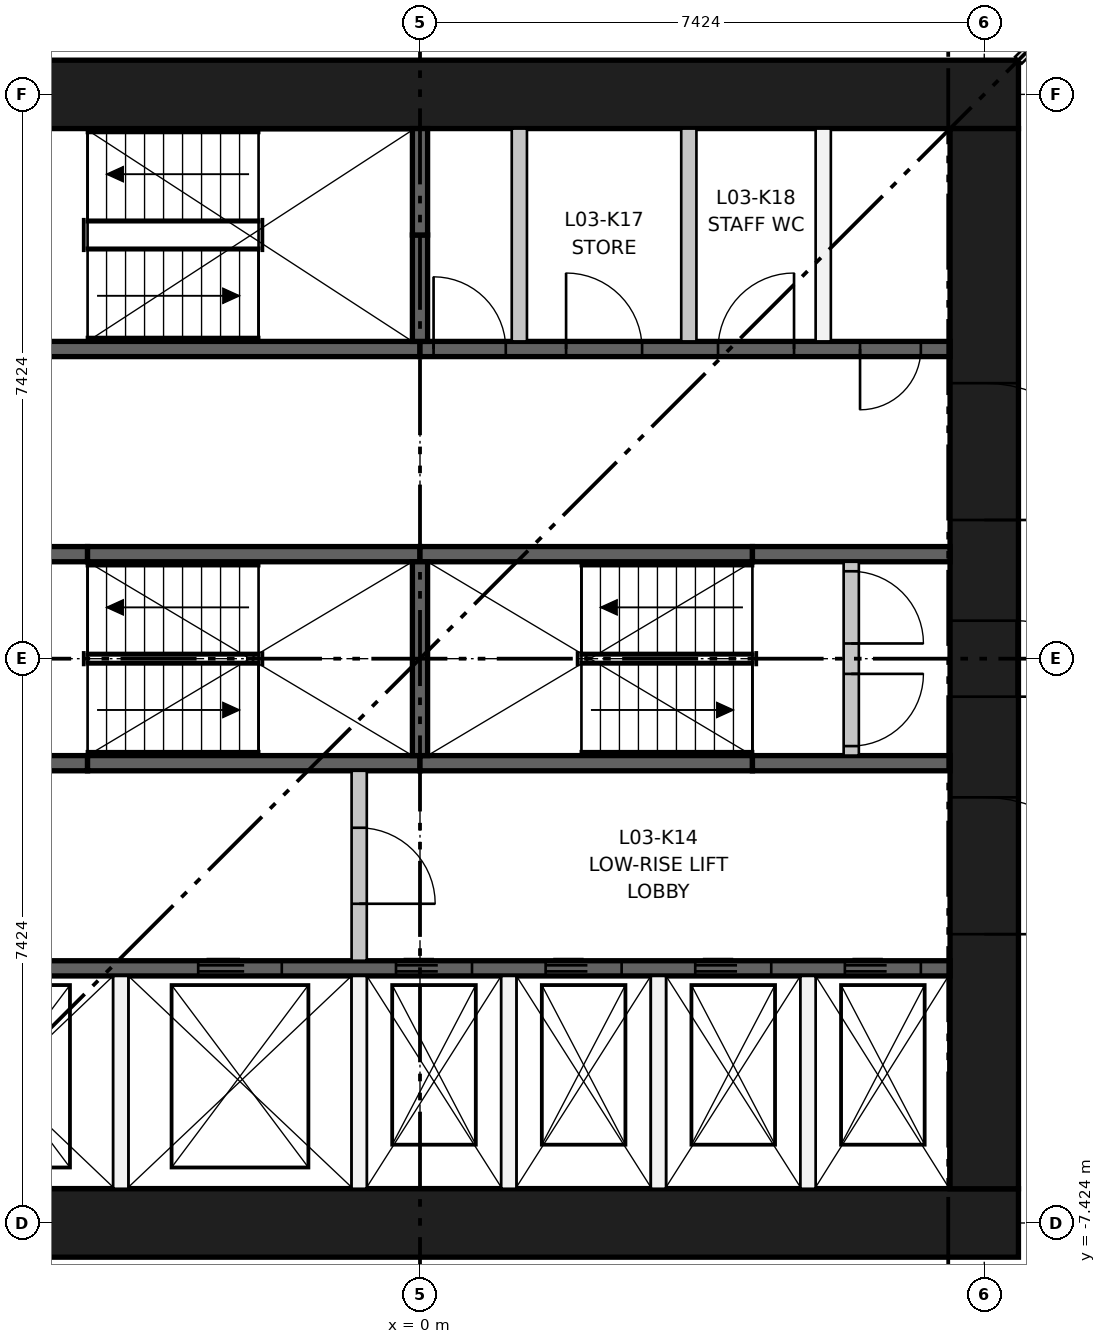
"""IFC4 building model, lengths in metres.
Left out: names, types, materials, properties, quantities, classifications, styles, units other than length and angle.
Written with IfcOpenShell. Run it as: python <this file> out.ifc"""

import sys

from ifc_helpers import new_model, si_unit, direction, frame, frame_2d, origin, place, context, subcontext, project, spatial, rectangle, extrude, element, fill, save


model = new_model("IFC4")
c1 = context("Model", 3, precision=1e-05, world=origin(), true_north=direction((0.0, 1.0)))
c2 = subcontext(c1, "Body", "Model", "MODEL_VIEW")
j1 = project(units=[si_unit("LENGTHUNIT", "METRE"), si_unit("PLANEANGLEUNIT", "RADIAN")], contexts=[c1])
p1 = place(None, origin())
s1 = spatial("IfcSite", under=j1, at=p1, CompositionType="ELEMENT")
p2 = place(p1, origin())
s2 = spatial("IfcBuilding", under=s1, at=p2, CompositionType="ELEMENT")
p3 = place(p2, frame((0.0, 0.0, 14.4)))
s3 = spatial("IfcBuildingStorey", under=s2, at=p3, CompositionType="ELEMENT", Elevation=14.4)
for number, where, z_axis, x_axis in (
    (1, (-7.874, -7.424, 0.0), (0.0, 0.0, 1.0), (1.0, 0.0, 0.0)),
    (2, (-7.874, 7.424, 0.0), (0.0, 0.0, 1.0), (1.0, 0.0, 0.0)),
):
    element("IfcWall", number, at=place(p3, frame(where, z_axis=z_axis, x_axis=x_axis)), inside=s3, PredefinedType="SHEAR", context=c2, shape_type="SweptSolid", body=[
        extrude(rectangle(XDim=15.748, YDim=0.9, at=frame_2d((7.874, 0.0))), origin(), (0.0, 0.0, 1.0), 4.1),
    ])
p4 = place(p3, frame((7.424, -6.974, 0.0), z_axis=(0.0, 0.0, 1.0), x_axis=(0.0, 1.0, 0.0)))
e3 = element("IfcWall", 3, at=p4, inside=s3, PredefinedType="SHEAR", context=c2, shape_type="SweptSolid", body=[
    extrude(rectangle(XDim=13.948, YDim=0.9, at=frame_2d((6.974, 0.0))), origin(), (0.0, 0.0, 1.0), 4.1),
])
p5 = place(p4, frame((6.474, 0.0, 0.0)))
e4 = element("IfcOpeningElement", 4, at=p5, cuts=e3, PredefinedType="OPENING", context=c2, shape_type="SweptSolid", body=[
    extrude(rectangle(XDim=1.0, YDim=2.1, at=frame_2d((0.5, 1.05))), frame((0.0, 0.46, 0.0), z_axis=(0.0, -1.0, 0.0), x_axis=(1.0, 0.0, 0.0)), (0.0, 0.0, 1.0), 0.92),
])
p6 = place(p4, frame((3.35, 0.0, 0.0)))
e5 = element("IfcOpeningElement", 5, at=p6, cuts=e3, PredefinedType="OPENING", context=c2, shape_type="SweptSolid", body=[
    extrude(rectangle(XDim=1.8, YDim=2.1, at=frame_2d((0.9, 1.05))), frame((0.0, 0.46, 0.0), z_axis=(0.0, -1.0, 0.0), x_axis=(1.0, 0.0, 0.0)), (0.0, 0.0, 1.0), 0.92),
])
p7 = place(p4, frame((8.799, 0.0, 0.0)))
e6 = element("IfcOpeningElement", 6, at=p7, cuts=e3, PredefinedType="OPENING", context=c2, shape_type="SweptSolid", body=[
    extrude(rectangle(XDim=1.8, YDim=2.1, at=frame_2d((0.9, 1.05))), frame((0.0, 0.46, 0.0), z_axis=(0.0, -1.0, 0.0), x_axis=(1.0, 0.0, 0.0)), (0.0, 0.0, 1.0), 0.92),
])
p8 = place(p3, frame((-6.974, -4.074, 0.0), z_axis=(0.0, 0.0, 1.0), x_axis=(1.0, 0.0, 0.0)))
e7 = element("IfcWall", 7, at=p8, inside=s3, PredefinedType="SHEAR", context=c2, shape_type="SweptSolid", body=[
    extrude(rectangle(XDim=13.948, YDim=0.2, at=frame_2d((6.974, 0.0))), origin(), (0.0, 0.0, 1.0), 3.7),
])
p9 = place(p8, frame((0.918, 0.0, 0.0)))
e8 = element("IfcOpeningElement", 8, at=p9, cuts=e7, PredefinedType="OPENING", context=c2, shape_type="SweptSolid", body=[
    extrude(rectangle(XDim=1.1, YDim=2.1, at=frame_2d((0.55, 1.05))), frame((0.0, 0.11, 0.0), z_axis=(0.0, -1.0, 0.0), x_axis=(1.0, 0.0, 0.0)), (0.0, 0.0, 1.0), 0.22),
])
p10 = place(p8, frame((4.055, 0.0, 0.0)))
e9 = element("IfcOpeningElement", 9, at=p10, cuts=e7, PredefinedType="OPENING", context=c2, shape_type="SweptSolid", body=[
    extrude(rectangle(XDim=1.1, YDim=2.1, at=frame_2d((0.55, 1.05))), frame((0.0, 0.11, 0.0), z_axis=(0.0, -1.0, 0.0), x_axis=(1.0, 0.0, 0.0)), (0.0, 0.0, 1.0), 0.22),
])
p11 = place(p8, frame((6.658, 0.0, 0.0)))
e10 = element("IfcOpeningElement", 10, at=p11, cuts=e7, PredefinedType="OPENING", context=c2, shape_type="SweptSolid", body=[
    extrude(rectangle(XDim=1.0, YDim=2.1, at=frame_2d((0.5, 1.05))), frame((0.0, 0.11, 0.0), z_axis=(0.0, -1.0, 0.0), x_axis=(1.0, 0.0, 0.0)), (0.0, 0.0, 1.0), 0.22),
])
p12 = place(p8, frame((8.627, 0.0, 0.0)))
e11 = element("IfcOpeningElement", 11, at=p12, cuts=e7, PredefinedType="OPENING", context=c2, shape_type="SweptSolid", body=[
    extrude(rectangle(XDim=1.0, YDim=2.1, at=frame_2d((0.5, 1.05))), frame((0.0, 0.11, 0.0), z_axis=(0.0, -1.0, 0.0), x_axis=(1.0, 0.0, 0.0)), (0.0, 0.0, 1.0), 0.22),
])
p13 = place(p8, frame((10.595, 0.0, 0.0)))
e12 = element("IfcOpeningElement", 12, at=p13, cuts=e7, PredefinedType="OPENING", context=c2, shape_type="SweptSolid", body=[
    extrude(rectangle(XDim=1.0, YDim=2.1, at=frame_2d((0.5, 1.05))), frame((0.0, 0.11, 0.0), z_axis=(0.0, -1.0, 0.0), x_axis=(1.0, 0.0, 0.0)), (0.0, 0.0, 1.0), 0.22),
])
p14 = place(p8, frame((12.564, 0.0, 0.0)))
e13 = element("IfcOpeningElement", 13, at=p14, cuts=e7, PredefinedType="OPENING", context=c2, shape_type="SweptSolid", body=[
    extrude(rectangle(XDim=1.0, YDim=2.1, at=frame_2d((0.5, 1.05))), frame((0.0, 0.11, 0.0), z_axis=(0.0, -1.0, 0.0), x_axis=(1.0, 0.0, 0.0)), (0.0, 0.0, 1.0), 0.22),
])
p15 = place(p3, frame((-6.974, 4.074, 0.0), z_axis=(0.0, 0.0, 1.0), x_axis=(1.0, 0.0, 0.0)))
e14 = element("IfcWall", 14, at=p15, inside=s3, PredefinedType="SHEAR", context=c2, shape_type="SweptSolid", body=[
    extrude(rectangle(XDim=6.974, YDim=0.2, at=frame_2d((3.487, 0.0))), origin(), (0.0, 0.0, 1.0), 3.7),
])
p16 = place(p3, frame((0.0, 4.074, 0.0), z_axis=(0.0, 0.0, 1.0), x_axis=(1.0, 0.0, 0.0)))
e15 = element("IfcWall", 15, at=p16, inside=s3, PredefinedType="SHEAR", context=c2, shape_type="SweptSolid", body=[
    extrude(rectangle(XDim=6.974, YDim=0.2, at=frame_2d((3.487, 0.0))), origin(), (0.0, 0.0, 1.0), 3.7),
])
p17 = place(p16, frame((0.179, 0.0, 0.0)))
e16 = element("IfcOpeningElement", 16, at=p17, cuts=e15, PredefinedType="OPENING", context=c2, shape_type="SweptSolid", body=[
    extrude(rectangle(XDim=0.95, YDim=2.1, at=frame_2d((0.475, 1.05))), frame((0.0, 0.11, 0.0), z_axis=(0.0, -1.0, 0.0), x_axis=(1.0, 0.0, 0.0)), (0.0, 0.0, 1.0), 0.22),
])
p18 = place(p16, frame((1.922, 0.0, 0.0)))
e17 = element("IfcOpeningElement", 17, at=p18, cuts=e15, PredefinedType="OPENING", context=c2, shape_type="SweptSolid", body=[
    extrude(rectangle(XDim=1.0, YDim=2.1, at=frame_2d((0.5, 1.05))), frame((0.0, 0.11, 0.0), z_axis=(0.0, -1.0, 0.0), x_axis=(1.0, 0.0, 0.0)), (0.0, 0.0, 1.0), 0.22),
])
p19 = place(p16, frame((3.921, 0.0, 0.0)))
e18 = element("IfcOpeningElement", 18, at=p19, cuts=e15, PredefinedType="OPENING", context=c2, shape_type="SweptSolid", body=[
    extrude(rectangle(XDim=1.0, YDim=2.1, at=frame_2d((0.5, 1.05))), frame((0.0, 0.11, 0.0), z_axis=(0.0, -1.0, 0.0), x_axis=(1.0, 0.0, 0.0)), (0.0, 0.0, 1.0), 0.22),
])
p20 = place(p16, frame((5.79, 0.0, 0.0)))
e19 = element("IfcOpeningElement", 19, at=p20, cuts=e15, PredefinedType="OPENING", context=c2, shape_type="SweptSolid", body=[
    extrude(rectangle(XDim=0.8, YDim=2.1, at=frame_2d((0.4, 1.05))), frame((0.0, 0.11, 0.0), z_axis=(0.0, -1.0, 0.0), x_axis=(1.0, 0.0, 0.0)), (0.0, 0.0, 1.0), 0.22),
])
p21 = place(p3, frame((-6.974, -1.375, 0.0), z_axis=(0.0, 0.0, 1.0), x_axis=(1.0, 0.0, 0.0)))
e20 = element("IfcWall", 20, at=p21, inside=s3, PredefinedType="SHEAR", context=c2, shape_type="SweptSolid", body=[
    extrude(rectangle(XDim=2.6, YDim=0.2, at=frame_2d((1.3, 0.0))), origin(), (0.0, 0.0, 1.0), 3.7),
])
for number, where, z_axis, x_axis in (
    (21, (-4.374, -1.375, 0.0), (0.0, 0.0, 1.0), (1.0, 0.0, 0.0)),
    (22, (0.0, -1.375, 0.0), (0.0, 0.0, 1.0), (1.0, 0.0, 0.0)),
):
    element("IfcWall", number, at=place(p3, frame(where, z_axis=z_axis, x_axis=x_axis)), inside=s3, PredefinedType="SHEAR", context=c2, shape_type="SweptSolid", body=[
        extrude(rectangle(XDim=4.374, YDim=0.2, at=frame_2d((2.187, 0.0))), origin(), (0.0, 0.0, 1.0), 3.7),
    ])
for number, where, z_axis, x_axis in (
    (23, (4.374, -1.375, 0.0), (0.0, 0.0, 1.0), (1.0, 0.0, 0.0)),
    (24, (-6.974, 1.375, 0.0), (0.0, 0.0, 1.0), (1.0, 0.0, 0.0)),
):
    element("IfcWall", number, at=place(p3, frame(where, z_axis=z_axis, x_axis=x_axis)), inside=s3, PredefinedType="SHEAR", context=c2, shape_type="SweptSolid", body=[
        extrude(rectangle(XDim=2.6, YDim=0.2, at=frame_2d((1.3, 0.0))), origin(), (0.0, 0.0, 1.0), 3.7),
    ])
for number, where, z_axis, x_axis in (
    (25, (-4.374, 1.375, 0.0), (0.0, 0.0, 1.0), (1.0, 0.0, 0.0)),
    (26, (0.0, 1.375, 0.0), (0.0, 0.0, 1.0), (1.0, 0.0, 0.0)),
):
    element("IfcWall", number, at=place(p3, frame(where, z_axis=z_axis, x_axis=x_axis)), inside=s3, PredefinedType="SHEAR", context=c2, shape_type="SweptSolid", body=[
        extrude(rectangle(XDim=4.374, YDim=0.2, at=frame_2d((2.187, 0.0))), origin(), (0.0, 0.0, 1.0), 3.7),
    ])
p22 = place(p3, frame((4.374, 1.375, 0.0), z_axis=(0.0, 0.0, 1.0), x_axis=(1.0, 0.0, 0.0)))
e27 = element("IfcWall", 27, at=p22, inside=s3, PredefinedType="SHEAR", context=c2, shape_type="SweptSolid", body=[
    extrude(rectangle(XDim=2.6, YDim=0.2, at=frame_2d((1.3, 0.0))), origin(), (0.0, 0.0, 1.0), 3.7),
])
p23 = place(p3, frame((0.0, -1.275, 0.0), z_axis=(0.0, 0.0, 1.0), x_axis=(0.0, 1.0, 0.0)))
e28 = element("IfcWall", 28, at=p23, inside=s3, PredefinedType="SHEAR", context=c2, shape_type="SweptSolid", body=[
    extrude(rectangle(XDim=2.55, YDim=0.2, at=frame_2d((1.275, 0.0))), origin(), (0.0, 0.0, 1.0), 3.7),
])
for number, where, z_axis, x_axis in (
    (29, (-3.937, -6.974, 0.0), (0.0, 0.0, 1.0), (0.0, 1.0, 0.0)),
    (30, (-0.8, -6.974, 0.0), (0.0, 0.0, 1.0), (0.0, 1.0, 0.0)),
):
    element("IfcWall", number, at=place(p3, frame(where, z_axis=z_axis, x_axis=x_axis)), inside=s3, PredefinedType="PARTITIONING", context=c2, shape_type="SweptSolid", body=[
        extrude(rectangle(XDim=2.8, YDim=0.2, at=frame_2d((1.4, 0.0))), origin(), (0.0, 0.0, 1.0), 3.7),
    ])
p24 = place(p3, frame((-0.8, -3.974, 0.0), z_axis=(0.0, 0.0, 1.0), x_axis=(0.0, 1.0, 0.0)))
e31 = element("IfcWall", 31, at=p24, inside=s3, PredefinedType="PARTITIONING", context=c2, shape_type="SweptSolid", body=[
    extrude(rectangle(XDim=2.499, YDim=0.2, at=frame_2d((1.25, 0.0))), origin(), (0.0, 0.0, 1.0), 3.7),
])
p25 = place(p24, frame((0.75, 0.0, 0.0)))
e32 = element("IfcOpeningElement", 32, at=p25, cuts=e31, PredefinedType="OPENING", context=c2, shape_type="SweptSolid", body=[
    extrude(rectangle(XDim=1.0, YDim=2.1, at=frame_2d((0.5, 1.05))), frame((0.0, 0.11, 0.0), z_axis=(0.0, -1.0, 0.0), x_axis=(1.0, 0.0, 0.0)), (0.0, 0.0, 1.0), 0.22),
])
for number, where, z_axis, x_axis in (
    (33, (1.168, -6.974, 0.0), (0.0, 0.0, 1.0), (0.0, 1.0, 0.0)),
    (34, (3.137, -6.974, 0.0), (0.0, 0.0, 1.0), (0.0, 1.0, 0.0)),
    (35, (5.105, -6.974, 0.0), (0.0, 0.0, 1.0), (0.0, 1.0, 0.0)),
):
    element("IfcWall", number, at=place(p3, frame(where, z_axis=z_axis, x_axis=x_axis)), inside=s3, PredefinedType="PARTITIONING", context=c2, shape_type="SweptSolid", body=[
        extrude(rectangle(XDim=2.8, YDim=0.2, at=frame_2d((1.4, 0.0))), origin(), (0.0, 0.0, 1.0), 3.7),
    ])
p26 = place(p3, frame((0.0, 4.174, 0.0), z_axis=(0.0, 0.0, 1.0), x_axis=(0.0, 1.0, 0.0)))
e36 = element("IfcWall", 36, at=p26, inside=s3, PredefinedType="SHEAR", context=c2, shape_type="SweptSolid", body=[
    extrude(rectangle(XDim=1.4, YDim=0.2, at=frame_2d((0.7, 0.0))), origin(), (0.0, 0.0, 1.0), 3.7),
])
p27 = place(p3, frame((0.0, 5.574, 0.0), z_axis=(0.0, 0.0, 1.0), x_axis=(0.0, 1.0, 0.0)))
e37 = element("IfcWall", 37, at=p27, inside=s3, PredefinedType="SHEAR", context=c2, shape_type="SweptSolid", body=[
    extrude(rectangle(XDim=1.4, YDim=0.2, at=frame_2d((0.7, 0.0))), origin(), (0.0, 0.0, 1.0), 3.7),
])
for number, where, z_axis, x_axis in (
    (38, (1.307, 4.174, 0.0), (0.0, 0.0, 1.0), (0.0, 1.0, 0.0)),
    (39, (3.537, 4.174, 0.0), (0.0, 0.0, 1.0), (0.0, 1.0, 0.0)),
    (40, (5.305, 4.174, 0.0), (0.0, 0.0, 1.0), (0.0, 1.0, 0.0)),
):
    element("IfcWall", number, at=place(p3, frame(where, z_axis=z_axis, x_axis=x_axis)), inside=s3, PredefinedType="PARTITIONING", context=c2, shape_type="SweptSolid", body=[
        extrude(rectangle(XDim=2.8, YDim=0.2, at=frame_2d((1.4, 0.0))), origin(), (0.0, 0.0, 1.0), 3.7),
    ])
p28 = place(p3, frame((5.674, -1.275, 0.0), z_axis=(0.0, 0.0, 1.0), x_axis=(0.0, 1.0, 0.0)))
e41 = element("IfcWall", 41, at=p28, inside=s3, PredefinedType="PARTITIONING", context=c2, shape_type="SweptSolid", body=[
    extrude(rectangle(XDim=2.55, YDim=0.2, at=frame_2d((1.275, 0.0))), origin(), (0.0, 0.0, 1.0), 3.7),
])
p29 = place(p28, frame((0.125, 0.0, 0.0)))
e42 = element("IfcOpeningElement", 42, at=p29, cuts=e41, PredefinedType="OPENING", context=c2, shape_type="SweptSolid", body=[
    extrude(rectangle(XDim=0.95, YDim=2.1, at=frame_2d((0.475, 1.05))), frame((0.0, 0.11, 0.0), z_axis=(0.0, -1.0, 0.0), x_axis=(1.0, 0.0, 0.0)), (0.0, 0.0, 1.0), 0.22),
])
p30 = place(p28, frame((1.475, 0.0, 0.0)))
e43 = element("IfcOpeningElement", 43, at=p30, cuts=e41, PredefinedType="OPENING", context=c2, shape_type="SweptSolid", body=[
    extrude(rectangle(XDim=0.95, YDim=2.1, at=frame_2d((0.475, 1.05))), frame((0.0, 0.11, 0.0), z_axis=(0.0, -1.0, 0.0), x_axis=(1.0, 0.0, 0.0)), (0.0, 0.0, 1.0), 0.22),
])
p31 = place(p3, frame((7.874, 7.874, 0.0), z_axis=(0.0, 0.0, 1.0), x_axis=(0.707106781187, 0.707106781187, 0.0)))
e44 = element("IfcWall", 44, at=p31, inside=s3, PredefinedType="PARTITIONING", context=c2, shape_type="SweptSolid", body=[
    extrude(rectangle(XDim=2.102, YDim=0.125, at=frame_2d((1.051, 0.0))), origin(), (0.0, 0.0, 1.0), 3.7),
])
p32 = place(p31, frame((0.6, 0.0, 0.0)))
e45 = element("IfcOpeningElement", 45, at=p32, cuts=e44, PredefinedType="OPENING", context=c2, shape_type="SweptSolid", body=[
    extrude(rectangle(XDim=1.0, YDim=2.1, at=frame_2d((0.5, 1.05))), frame((0.0, 0.073, 0.0), z_axis=(0.0, -1.0, 0.0), x_axis=(1.0, 0.0, 0.0)), (0.0, 0.0, 1.0), 0.145),
])
p33 = place(p10, origin())
e46 = element("IfcDoor", 46, at=p33, inside=s3, OperationType="DOUBLE_DOOR_SLIDING", PredefinedType="DOOR", context=c2, shape_type="SweptSolid", body=[
    extrude(rectangle(XDim=1.1, YDim=2.1, at=frame_2d((0.55, 1.05))), frame((0.0, 0.025, 0.0), z_axis=(0.0, -1.0, 0.0), x_axis=(1.0, 0.0, 0.0)), (0.0, 0.0, 1.0), 0.05),
])
fill(e9, e46)
p34 = place(p11, origin())
e47 = element("IfcDoor", 47, at=p34, inside=s3, OperationType="DOUBLE_DOOR_SLIDING", PredefinedType="DOOR", context=c2, shape_type="SweptSolid", body=[
    extrude(rectangle(XDim=1.0, YDim=2.1, at=frame_2d((0.5, 1.05))), frame((0.0, 0.025, 0.0), z_axis=(0.0, -1.0, 0.0), x_axis=(1.0, 0.0, 0.0)), (0.0, 0.0, 1.0), 0.05),
])
fill(e10, e47)
p35 = place(p12, origin())
e48 = element("IfcDoor", 48, at=p35, inside=s3, OperationType="DOUBLE_DOOR_SLIDING", PredefinedType="DOOR", context=c2, shape_type="SweptSolid", body=[
    extrude(rectangle(XDim=1.0, YDim=2.1, at=frame_2d((0.5, 1.05))), frame((0.0, 0.025, 0.0), z_axis=(0.0, -1.0, 0.0), x_axis=(1.0, 0.0, 0.0)), (0.0, 0.0, 1.0), 0.05),
])
fill(e11, e48)
p36 = place(p13, origin())
e49 = element("IfcDoor", 49, at=p36, inside=s3, OperationType="DOUBLE_DOOR_SLIDING", PredefinedType="DOOR", context=c2, shape_type="SweptSolid", body=[
    extrude(rectangle(XDim=1.0, YDim=2.1, at=frame_2d((0.5, 1.05))), frame((0.0, 0.025, 0.0), z_axis=(0.0, -1.0, 0.0), x_axis=(1.0, 0.0, 0.0)), (0.0, 0.0, 1.0), 0.05),
])
fill(e12, e49)
p37 = place(p14, origin())
e50 = element("IfcDoor", 50, at=p37, inside=s3, OperationType="DOUBLE_DOOR_SLIDING", PredefinedType="DOOR", context=c2, shape_type="SweptSolid", body=[
    extrude(rectangle(XDim=1.0, YDim=2.1, at=frame_2d((0.5, 1.05))), frame((0.0, 0.025, 0.0), z_axis=(0.0, -1.0, 0.0), x_axis=(1.0, 0.0, 0.0)), (0.0, 0.0, 1.0), 0.05),
])
fill(e13, e50)
p38 = place(p29, frame((0.95, 0.0, 0.0), z_axis=(0.0, 0.0, 1.0), x_axis=(-1.0, 0.0, 0.0)))
e51 = element("IfcDoor", 51, at=p38, inside=s3, OperationType="SINGLE_SWING_RIGHT", PredefinedType="DOOR", context=c2, shape_type="SweptSolid", body=[
    extrude(rectangle(XDim=0.95, YDim=2.1, at=frame_2d((0.475, 1.05))), frame((0.0, 0.025, 0.0), z_axis=(0.0, -1.0, 0.0), x_axis=(1.0, 0.0, 0.0)), (0.0, 0.0, 1.0), 0.05),
])
fill(e42, e51)
p39 = place(p30, frame((0.95, 0.0, 0.0), z_axis=(0.0, 0.0, 1.0), x_axis=(-1.0, 0.0, 0.0)))
e52 = element("IfcDoor", 52, at=p39, inside=s3, OperationType="SINGLE_SWING_LEFT", PredefinedType="DOOR", context=c2, shape_type="SweptSolid", body=[
    extrude(rectangle(XDim=0.95, YDim=2.1, at=frame_2d((0.475, 1.05))), frame((0.0, 0.025, 0.0), z_axis=(0.0, -1.0, 0.0), x_axis=(1.0, 0.0, 0.0)), (0.0, 0.0, 1.0), 0.05),
])
fill(e43, e52)
p40 = place(p25, frame((1.0, 0.0, 0.0), z_axis=(0.0, 0.0, 1.0), x_axis=(-1.0, 0.0, 0.0)))
e53 = element("IfcDoor", 53, at=p40, inside=s3, OperationType="SINGLE_SWING_LEFT", PredefinedType="DOOR", context=c2, shape_type="SweptSolid", body=[
    extrude(rectangle(XDim=1.0, YDim=2.1, at=frame_2d((0.5, 1.05))), frame((0.0, 0.025, 0.0), z_axis=(0.0, -1.0, 0.0), x_axis=(1.0, 0.0, 0.0)), (0.0, 0.0, 1.0), 0.05),
])
fill(e32, e53)
p41 = place(p17, origin())
e54 = element("IfcDoor", 54, at=p41, inside=s3, OperationType="SINGLE_SWING_LEFT", PredefinedType="DOOR", context=c2, shape_type="SweptSolid", body=[
    extrude(rectangle(XDim=0.95, YDim=2.1, at=frame_2d((0.475, 1.05))), frame((0.0, 0.025, 0.0), z_axis=(0.0, -1.0, 0.0), x_axis=(1.0, 0.0, 0.0)), (0.0, 0.0, 1.0), 0.05),
])
fill(e16, e54)
p42 = place(p18, origin())
e55 = element("IfcDoor", 55, at=p42, inside=s3, OperationType="SINGLE_SWING_LEFT", PredefinedType="DOOR", context=c2, shape_type="SweptSolid", body=[
    extrude(rectangle(XDim=1.0, YDim=2.1, at=frame_2d((0.5, 1.05))), frame((0.0, 0.025, 0.0), z_axis=(0.0, -1.0, 0.0), x_axis=(1.0, 0.0, 0.0)), (0.0, 0.0, 1.0), 0.05),
])
fill(e17, e55)
p43 = place(p19, origin())
e56 = element("IfcDoor", 56, at=p43, inside=s3, OperationType="SINGLE_SWING_RIGHT", PredefinedType="DOOR", context=c2, shape_type="SweptSolid", body=[
    extrude(rectangle(XDim=1.0, YDim=2.1, at=frame_2d((0.5, 1.05))), frame((0.0, 0.025, 0.0), z_axis=(0.0, -1.0, 0.0), x_axis=(1.0, 0.0, 0.0)), (0.0, 0.0, 1.0), 0.05),
])
fill(e18, e56)
p44 = place(p20, frame((0.8, 0.0, 0.0), z_axis=(0.0, 0.0, 1.0), x_axis=(-1.0, 0.0, 0.0)))
e57 = element("IfcDoor", 57, at=p44, inside=s3, OperationType="SINGLE_SWING_LEFT", PredefinedType="DOOR", context=c2, shape_type="SweptSolid", body=[
    extrude(rectangle(XDim=0.8, YDim=2.1, at=frame_2d((0.4, 1.05))), frame((0.0, 0.025, 0.0), z_axis=(0.0, -1.0, 0.0), x_axis=(1.0, 0.0, 0.0)), (0.0, 0.0, 1.0), 0.05),
])
fill(e19, e57)
p45 = place(p5, frame((1.0, 0.0, 0.0), z_axis=(0.0, 0.0, 1.0), x_axis=(-1.0, 0.0, 0.0)))
e58 = element("IfcDoor", 58, at=p45, inside=s3, OperationType="SINGLE_SWING_LEFT", PredefinedType="DOOR", context=c2, shape_type="SweptSolid", body=[
    extrude(rectangle(XDim=1.0, YDim=2.1, at=frame_2d((0.5, 1.05))), frame((0.0, 0.45, 0.0), z_axis=(0.0, -1.0, 0.0), x_axis=(1.0, 0.0, 0.0)), (0.0, 0.0, 1.0), 0.05),
])
fill(e4, e58)
p46 = place(p6, frame((1.8, 0.0, 0.0), z_axis=(0.0, 0.0, 1.0), x_axis=(-1.0, 0.0, 0.0)))
e59 = element("IfcDoor", 59, at=p46, inside=s3, OperationType="DOUBLE_DOOR_SINGLE_SWING", PredefinedType="DOOR", context=c2, shape_type="SweptSolid", body=[
    extrude(rectangle(XDim=1.8, YDim=2.1, at=frame_2d((0.9, 1.05))), frame((0.0, 0.025, 0.0), z_axis=(0.0, -1.0, 0.0), x_axis=(1.0, 0.0, 0.0)), (0.0, 0.0, 1.0), 0.05),
])
fill(e5, e59)
p47 = place(p7, frame((1.8, 0.0, 0.0), z_axis=(0.0, 0.0, 1.0), x_axis=(-1.0, 0.0, 0.0)))
e60 = element("IfcDoor", 60, at=p47, inside=s3, OperationType="DOUBLE_DOOR_SINGLE_SWING", PredefinedType="DOOR", context=c2, shape_type="SweptSolid", body=[
    extrude(rectangle(XDim=1.8, YDim=2.1, at=frame_2d((0.9, 1.05))), frame((0.0, 0.025, 0.0), z_axis=(0.0, -1.0, 0.0), x_axis=(1.0, 0.0, 0.0)), (0.0, 0.0, 1.0), 0.05),
])
fill(e6, e60)
save(model, sys.argv[1])
